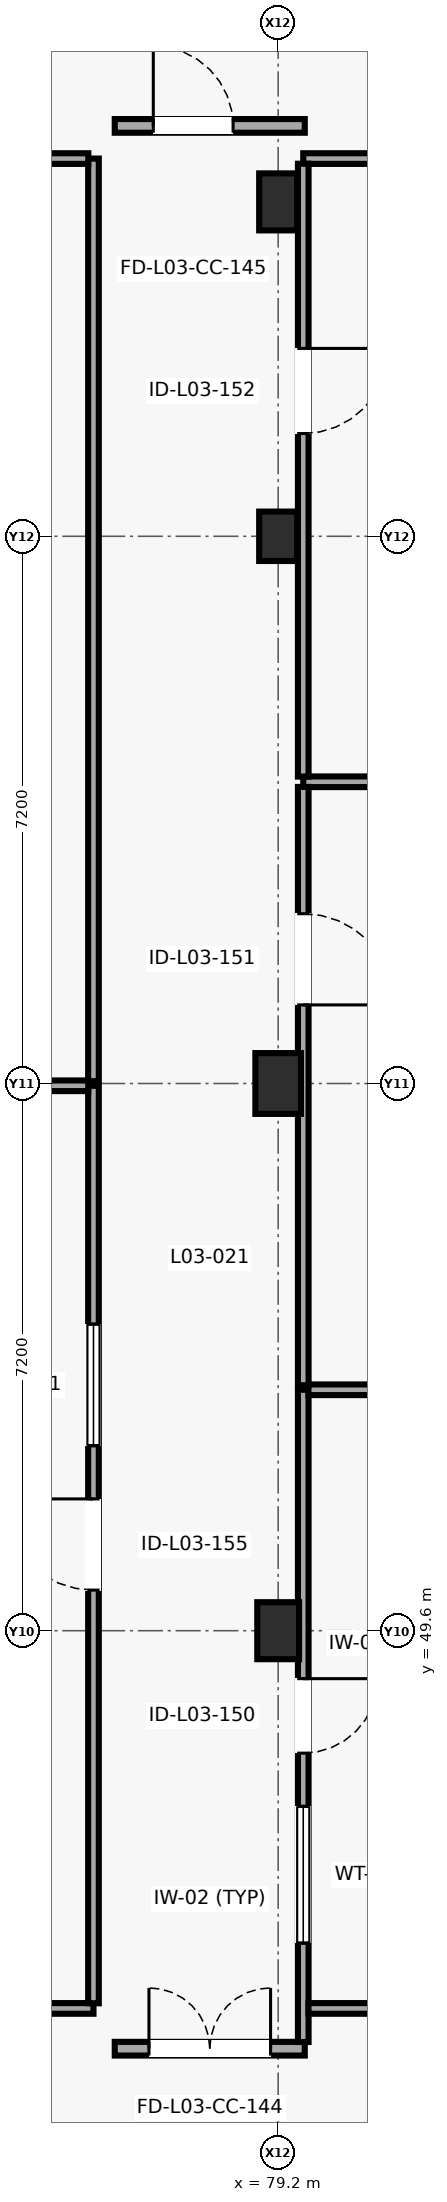
"""IFC4 building model, lengths in metres.
Left out: names, types, materials, properties, quantities, classifications, styles, units other than length and angle.
Written with IfcOpenShell. Run it as: python <this file> out.ifc"""

import sys

from ifc_helpers import new_model, si_unit, direction, frame, frame_2d, origin, origin_2d, place, context, subcontext, project, spatial, rectangle, extrude, element, fill, save


model = new_model("IFC4")
c1 = context("Model", 3, precision=1e-05, world=origin(), true_north=direction((0.0, 1.0)))
c2 = subcontext(c1, "Body", "Model", "MODEL_VIEW")
j1 = project(units=[si_unit("LENGTHUNIT", "METRE"), si_unit("PLANEANGLEUNIT", "RADIAN")], contexts=[c1])
p1 = place(None, origin())
s1 = spatial("IfcSite", under=j1, at=p1, CompositionType="ELEMENT")
p2 = place(p1, origin())
s2 = spatial("IfcBuilding", under=s1, at=p2, CompositionType="ELEMENT")
p3 = place(p2, frame((0.0, 0.0, 12.2)))
s3 = spatial("IfcBuildingStorey", under=s2, at=p3, CompositionType="ELEMENT", Elevation=12.2)
p4 = place(p3, frame((79.2, 49.6, 0.0), z_axis=(0.0, 0.0, 1.0), x_axis=(1.0, 0.0, 0.0)))
e1 = element("IfcColumn", 1, at=p4, inside=s3, PredefinedType="COLUMN", context=c2, shape_type="SweptSolid", body=[
    extrude(rectangle(XDim=0.55, YDim=0.75, at=origin_2d()), origin(), (0.0, 0.0, 1.0), 4.0),
])
p5 = place(p3, frame((79.2, 56.8, 0.0), z_axis=(0.0, 0.0, 1.0), x_axis=(1.0, 0.0, 0.0)))
e2 = element("IfcColumn", 2, at=p5, inside=s3, PredefinedType="COLUMN", context=c2, shape_type="SweptSolid", body=[
    extrude(rectangle(XDim=0.6, YDim=0.8, at=origin_2d()), origin(), (0.0, 0.0, 1.0), 4.0),
])
p6 = place(p3, frame((79.2, 64.0, 0.0), z_axis=(0.0, 0.0, 1.0), x_axis=(1.0, 0.0, 0.0)))
e3 = element("IfcColumn", 3, at=p6, inside=s3, PredefinedType="COLUMN", context=c2, shape_type="SweptSolid", body=[
    extrude(rectangle(XDim=0.5, YDim=0.65, at=origin_2d()), origin(), (0.0, 0.0, 1.0), 4.0),
])
p7 = place(p3, frame((79.2, 68.4, 0.0), z_axis=(0.0, 0.0, 1.0), x_axis=(1.0, 0.0, 0.0)))
e4 = element("IfcColumn", 4, at=p7, inside=s3, PredefinedType="COLUMN", context=c2, shape_type="SweptSolid", body=[
    extrude(rectangle(XDim=0.5, YDim=0.75, at=origin_2d()), origin(), (0.0, 0.0, 1.0), 4.0),
])
p8 = place(p3, frame((77.05, 44.1, 0.0), z_axis=(0.0, 0.0, 1.0), x_axis=(1.0, 0.0, 0.0)))
e5 = element("IfcWall", 5, at=p8, inside=s3, PredefinedType="PARTITIONING", context=c2, shape_type="SweptSolid", body=[
    extrude(rectangle(XDim=2.5, YDim=0.18, at=frame_2d((1.25, 0.0))), origin(), (0.0, 0.0, 1.0), 3.78),
])
p9 = place(p8, frame((0.45, 0.0, 0.0)))
e6 = element("IfcOpeningElement", 6, at=p9, cuts=e5, PredefinedType="OPENING", context=c2, shape_type="SweptSolid", body=[
    extrude(rectangle(XDim=1.6, YDim=2.25, at=frame_2d((0.8, 1.125))), frame((0.0, 0.1, 0.0), z_axis=(0.0, -1.0, 0.0), x_axis=(1.0, 0.0, 0.0)), (0.0, 0.0, 1.0), 0.2),
])
p10 = place(p3, frame((77.05, 69.4, 0.0), z_axis=(0.0, 0.0, 1.0), x_axis=(1.0, 0.0, 0.0)))
e7 = element("IfcWall", 7, at=p10, inside=s3, PredefinedType="PARTITIONING", context=c2, shape_type="SweptSolid", body=[
    extrude(rectangle(XDim=2.5, YDim=0.18, at=frame_2d((1.25, 0.0))), origin(), (0.0, 0.0, 1.0), 3.78),
])
p11 = place(p10, frame((0.507, 0.0, 0.0)))
e8 = element("IfcOpeningElement", 8, at=p11, cuts=e7, PredefinedType="OPENING", context=c2, shape_type="SweptSolid", body=[
    extrude(rectangle(XDim=1.05, YDim=2.15, at=frame_2d((0.525, 1.075))), frame((0.0, 0.1, 0.0), z_axis=(0.0, -1.0, 0.0), x_axis=(1.0, 0.0, 0.0)), (0.0, 0.0, 1.0), 0.2),
])
p12 = place(p3, frame((79.53, 52.77, 0.0), z_axis=(0.0, 0.0, 1.0), x_axis=(0.0, -1.0, 0.0)))
e9 = element("IfcWall", 9, at=p12, inside=s3, PredefinedType="PARTITIONING", context=c2, shape_type="SweptSolid", body=[
    extrude(rectangle(XDim=8.582, YDim=0.14, at=frame_2d((4.291, 0.0))), origin(), (0.0, 0.0, 1.0), 3.755),
])
p13 = place(p12, frame((3.801, 0.0, 0.0)))
e10 = element("IfcOpeningElement", 10, at=p13, cuts=e9, PredefinedType="OPENING", context=c2, shape_type="SweptSolid", body=[
    extrude(rectangle(XDim=0.98, YDim=2.12, at=frame_2d((0.49, 1.06))), frame((0.0, 0.08, 0.0), z_axis=(0.0, -1.0, 0.0), x_axis=(1.0, 0.0, 0.0)), (0.0, 0.0, 1.0), 0.16),
])
p14 = place(p12, frame((5.481, 0.0, 1.05)))
e11 = element("IfcOpeningElement", 11, at=p14, cuts=e9, PredefinedType="OPENING", context=c2, shape_type="SweptSolid", body=[
    extrude(rectangle(XDim=1.8, YDim=1.2, at=frame_2d((0.9, 0.6))), frame((0.0, 0.08, 0.0), z_axis=(0.0, -1.0, 0.0), x_axis=(1.0, 0.0, 0.0)), (0.0, 0.0, 1.0), 0.16),
])
p15 = place(p3, frame((79.598, 44.63, 0.0), z_axis=(0.0, 0.0, 1.0), x_axis=(1.0, 0.0, 0.0)))
e12 = element("IfcWall", 12, at=p15, inside=s3, PredefinedType="PARTITIONING", context=c2, shape_type="SweptSolid", body=[
    extrude(rectangle(XDim=8.372, YDim=0.14, at=frame_2d((4.186, 0.0))), origin(), (0.0, 0.0, 1.0), 3.755),
])
p16 = place(p3, frame((87.902, 52.77, 0.0), z_axis=(0.0, 0.0, 1.0), x_axis=(-1.0, 0.0, 0.0)))
e13 = element("IfcWall", 13, at=p16, inside=s3, PredefinedType="PARTITIONING", context=c2, shape_type="SweptSolid", body=[
    extrude(rectangle(XDim=8.304, YDim=0.14, at=frame_2d((4.152, 0.0))), origin(), (0.0, 0.0, 1.0), 3.755),
])
p17 = place(p3, frame((87.97, 60.77, 0.0), z_axis=(0.0, 0.0, 1.0), x_axis=(-1.0, 0.0, 0.0)))
e14 = element("IfcWall", 14, at=p17, inside=s3, PredefinedType="PARTITIONING", context=c2, shape_type="SweptSolid", body=[
    extrude(rectangle(XDim=8.44, YDim=0.14, at=frame_2d((4.22, 0.0))), origin(), (0.0, 0.0, 1.0), 3.755),
])
p18 = place(p3, frame((79.53, 60.702, 0.0), z_axis=(0.0, 0.0, 1.0), x_axis=(0.0, -1.0, 0.0)))
e15 = element("IfcWall", 15, at=p18, inside=s3, PredefinedType="PARTITIONING", context=c2, shape_type="SweptSolid", body=[
    extrude(rectangle(XDim=7.872, YDim=0.14, at=frame_2d((3.936, 0.0))), origin(), (0.0, 0.0, 1.0), 3.755),
])
p19 = place(p18, frame((1.668, 0.0, 0.0)))
e16 = element("IfcOpeningElement", 16, at=p19, cuts=e15, PredefinedType="OPENING", context=c2, shape_type="SweptSolid", body=[
    extrude(rectangle(XDim=1.2, YDim=2.15, at=frame_2d((0.6, 1.075))), frame((0.0, 0.08, 0.0), z_axis=(0.0, -1.0, 0.0), x_axis=(1.0, 0.0, 0.0)), (0.0, 0.0, 1.0), 0.16),
])
p20 = place(p3, frame((87.902, 68.97, 0.0), z_axis=(0.0, 0.0, 1.0), x_axis=(-1.0, 0.0, 0.0)))
e17 = element("IfcWall", 17, at=p20, inside=s3, PredefinedType="PARTITIONING", context=c2, shape_type="SweptSolid", body=[
    extrude(rectangle(XDim=8.372, YDim=0.14, at=frame_2d((4.186, 0.0))), origin(), (0.0, 0.0, 1.0), 3.755),
])
p21 = place(p3, frame((79.53, 68.902, 0.0), z_axis=(0.0, 0.0, 1.0), x_axis=(0.0, -1.0, 0.0)))
e18 = element("IfcWall", 18, at=p21, inside=s3, PredefinedType="PARTITIONING", context=c2, shape_type="SweptSolid", body=[
    extrude(rectangle(XDim=8.064, YDim=0.14, at=frame_2d((4.032, 0.0))), origin(), (0.0, 0.0, 1.0), 3.755),
])
p22 = place(p21, frame((2.43, 0.0, 0.0)))
e19 = element("IfcOpeningElement", 19, at=p22, cuts=e18, PredefinedType="OPENING", context=c2, shape_type="SweptSolid", body=[
    extrude(rectangle(XDim=1.12, YDim=2.18, at=frame_2d((0.56, 1.09))), frame((0.0, 0.08, 0.0), z_axis=(0.0, -1.0, 0.0), x_axis=(1.0, 0.0, 0.0)), (0.0, 0.0, 1.0), 0.16),
])
p23 = place(p3, frame((63.43, 44.63, 0.0), z_axis=(0.0, 0.0, 1.0), x_axis=(1.0, 0.0, 0.0)))
e20 = element("IfcWall", 20, at=p23, inside=s3, PredefinedType="PARTITIONING", context=c2, shape_type="SweptSolid", body=[
    extrude(rectangle(XDim=13.34, YDim=0.14, at=frame_2d((6.67, 0.0))), origin(), (0.0, 0.0, 1.0), 3.755),
])
p24 = place(p3, frame((76.77, 44.698, 0.0), z_axis=(0.0, 0.0, 1.0), x_axis=(0.0, 1.0, 0.0)))
e21 = element("IfcWall", 21, at=p24, inside=s3, PredefinedType="PARTITIONING", context=c2, shape_type="SweptSolid", body=[
    extrude(rectangle(XDim=12.072, YDim=0.14, at=frame_2d((6.036, 0.0))), origin(), (0.0, 0.0, 1.0), 3.755),
])
p25 = place(p24, frame((5.436, 0.0, 0.0)))
e22 = element("IfcOpeningElement", 22, at=p25, cuts=e21, PredefinedType="OPENING", context=c2, shape_type="SweptSolid", body=[
    extrude(rectangle(XDim=1.2, YDim=2.15, at=frame_2d((0.6, 1.075))), frame((0.0, 0.08, 0.0), z_axis=(0.0, -1.0, 0.0), x_axis=(1.0, 0.0, 0.0)), (0.0, 0.0, 1.0), 0.16),
])
p26 = place(p24, frame((7.336, 0.0, 1.05)))
e23 = element("IfcOpeningElement", 23, at=p26, cuts=e21, PredefinedType="OPENING", context=c2, shape_type="SweptSolid", body=[
    extrude(rectangle(XDim=1.6, YDim=1.1, at=frame_2d((0.8, 0.55))), frame((0.0, 0.08, 0.0), z_axis=(0.0, -1.0, 0.0), x_axis=(1.0, 0.0, 0.0)), (0.0, 0.0, 1.0), 0.16),
])
p27 = place(p3, frame((76.702, 56.77, 0.0), z_axis=(0.0, 0.0, 1.0), x_axis=(-1.0, 0.0, 0.0)))
e24 = element("IfcWall", 24, at=p27, inside=s3, PredefinedType="PARTITIONING", context=c2, shape_type="SweptSolid", body=[
    extrude(rectangle(XDim=2.132, YDim=0.14, at=frame_2d((1.066, 0.0))), origin(), (0.0, 0.0, 1.0), 3.755),
])
p28 = place(p3, frame((76.77, 56.83, 0.0), z_axis=(0.0, 0.0, 1.0), x_axis=(0.0, 1.0, 0.0)))
e25 = element("IfcWall", 25, at=p28, inside=s3, PredefinedType="PARTITIONING", context=c2, shape_type="SweptSolid", body=[
    extrude(rectangle(XDim=12.14, YDim=0.14, at=frame_2d((6.07, 0.0))), origin(), (0.0, 0.0, 1.0), 3.755),
])
p29 = place(p3, frame((76.702, 68.97, 0.0), z_axis=(0.0, 0.0, 1.0), x_axis=(-1.0, 0.0, 0.0)))
e26 = element("IfcWall", 26, at=p29, inside=s3, PredefinedType="PARTITIONING", context=c2, shape_type="SweptSolid", body=[
    extrude(rectangle(XDim=13.272, YDim=0.14, at=frame_2d((6.636, 0.0))), origin(), (0.0, 0.0, 1.0), 3.755),
])
p30 = place(p29, frame((6.076, 0.0, 0.0)))
e27 = element("IfcOpeningElement", 27, at=p30, cuts=e26, PredefinedType="OPENING", context=c2, shape_type="SweptSolid", body=[
    extrude(rectangle(XDim=1.12, YDim=2.18, at=frame_2d((0.56, 1.09))), frame((0.0, 0.08, 0.0), z_axis=(0.0, -1.0, 0.0), x_axis=(1.0, 0.0, 0.0)), (0.0, 0.0, 1.0), 0.16),
])
p31 = place(p29, frame((7.896, 0.0, 1.05)))
e28 = element("IfcOpeningElement", 28, at=p31, cuts=e26, PredefinedType="OPENING", context=c2, shape_type="SweptSolid", body=[
    extrude(rectangle(XDim=1.8, YDim=1.2, at=frame_2d((0.9, 0.6))), frame((0.0, 0.08, 0.0), z_axis=(0.0, -1.0, 0.0), x_axis=(1.0, 0.0, 0.0)), (0.0, 0.0, 1.0), 0.16),
])
p32 = place(p9, origin())
e29 = element("IfcDoor", 29, at=p32, inside=s3, OperationType="DOUBLE_DOOR_SINGLE_SWING", PredefinedType="DOOR", context=c2, shape_type="SweptSolid", body=[
    extrude(rectangle(XDim=1.6, YDim=2.25, at=frame_2d((0.8, 1.125))), frame((0.0, 0.025, 0.0), z_axis=(0.0, -1.0, 0.0), x_axis=(1.0, 0.0, 0.0)), (0.0, 0.0, 1.0), 0.05),
])
fill(e6, e29)
p33 = place(p11, origin())
e30 = element("IfcDoor", 30, at=p33, inside=s3, OperationType="SINGLE_SWING_LEFT", PredefinedType="DOOR", context=c2, shape_type="SweptSolid", body=[
    extrude(rectangle(XDim=1.05, YDim=2.15, at=frame_2d((0.525, 1.075))), frame((0.0, 0.025, 0.0), z_axis=(0.0, -1.0, 0.0), x_axis=(1.0, 0.0, 0.0)), (0.0, 0.0, 1.0), 0.05),
])
fill(e8, e30)
p34 = place(p13, origin())
e31 = element("IfcDoor", 31, at=p34, inside=s3, OperationType="SINGLE_SWING_LEFT", PredefinedType="DOOR", context=c2, shape_type="SweptSolid", body=[
    extrude(rectangle(XDim=0.98, YDim=2.12, at=frame_2d((0.49, 1.06))), frame((0.0, 0.025, 0.0), z_axis=(0.0, -1.0, 0.0), x_axis=(1.0, 0.0, 0.0)), (0.0, 0.0, 1.0), 0.05),
])
fill(e10, e31)
p35 = place(p14, origin())
e32 = element("IfcWindow", 32, at=p35, inside=s3, PartitioningType="SINGLE_PANEL", PredefinedType="WINDOW", context=c2, shape_type="SweptSolid", body=[
    extrude(rectangle(XDim=1.8, YDim=1.2, at=frame_2d((0.9, 0.6))), frame((0.0, 0.03, 0.0), z_axis=(0.0, -1.0, 0.0), x_axis=(1.0, 0.0, 0.0)), (0.0, 0.0, 1.0), 0.06),
])
fill(e11, e32)
p36 = place(p19, origin())
e33 = element("IfcDoor", 33, at=p36, inside=s3, OperationType="SINGLE_SWING_RIGHT", PredefinedType="DOOR", context=c2, shape_type="SweptSolid", body=[
    extrude(rectangle(XDim=1.2, YDim=2.15, at=frame_2d((0.6, 1.075))), frame((0.0, 0.025, 0.0), z_axis=(0.0, -1.0, 0.0), x_axis=(1.0, 0.0, 0.0)), (0.0, 0.0, 1.0), 0.05),
])
fill(e16, e33)
p37 = place(p22, origin())
e34 = element("IfcDoor", 34, at=p37, inside=s3, OperationType="SINGLE_SWING_LEFT", PredefinedType="DOOR", context=c2, shape_type="SweptSolid", body=[
    extrude(rectangle(XDim=1.12, YDim=2.18, at=frame_2d((0.56, 1.09))), frame((0.0, 0.025, 0.0), z_axis=(0.0, -1.0, 0.0), x_axis=(1.0, 0.0, 0.0)), (0.0, 0.0, 1.0), 0.05),
])
fill(e19, e34)
p38 = place(p25, origin())
e35 = element("IfcDoor", 35, at=p38, inside=s3, OperationType="SINGLE_SWING_RIGHT", PredefinedType="DOOR", context=c2, shape_type="SweptSolid", body=[
    extrude(rectangle(XDim=1.2, YDim=2.15, at=frame_2d((0.6, 1.075))), frame((0.0, 0.025, 0.0), z_axis=(0.0, -1.0, 0.0), x_axis=(1.0, 0.0, 0.0)), (0.0, 0.0, 1.0), 0.05),
])
fill(e22, e35)
p39 = place(p26, origin())
e36 = element("IfcWindow", 36, at=p39, inside=s3, PartitioningType="SINGLE_PANEL", PredefinedType="WINDOW", context=c2, shape_type="SweptSolid", body=[
    extrude(rectangle(XDim=1.6, YDim=1.1, at=frame_2d((0.8, 0.55))), frame((0.0, 0.03, 0.0), z_axis=(0.0, -1.0, 0.0), x_axis=(1.0, 0.0, 0.0)), (0.0, 0.0, 1.0), 0.06),
])
fill(e23, e36)
save(model, sys.argv[1])
